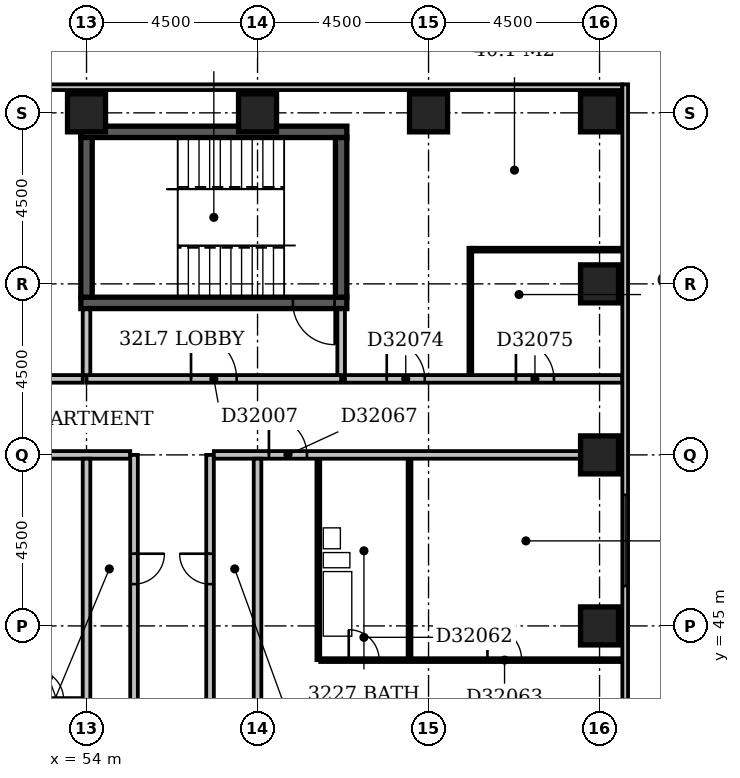
"""IFC4 building model, lengths in metres.
Left out: names, types, materials, properties, quantities, classifications, styles, units other than length and angle.
Written with IfcOpenShell. Run it as: python <this file> out.ifc"""

import sys

from ifc_helpers import new_model, si_unit, direction, frame, frame_2d, origin, origin_2d, place, context, subcontext, project, spatial, rectangle, extrude, element, fill, save


model = new_model("IFC4")
c1 = context("Model", 3, precision=1e-05, world=origin(), true_north=direction((0.0, 1.0)))
c2 = subcontext(c1, "Body", "Model", "MODEL_VIEW")
j1 = project(units=[si_unit("LENGTHUNIT", "METRE"), si_unit("PLANEANGLEUNIT", "RADIAN")], contexts=[c1])
p1 = place(None, origin())
s1 = spatial("IfcSite", under=j1, at=p1, CompositionType="ELEMENT")
p2 = place(p1, origin())
s2 = spatial("IfcBuilding", under=s1, at=p2, CompositionType="ELEMENT")
p3 = place(p2, frame((0.0, 0.0, 130.4)))
s3 = spatial("IfcBuildingStorey", under=s2, at=p3, CompositionType="ELEMENT", Elevation=130.4)
p4 = place(p3, frame((53.85, 53.5, -0.3), z_axis=(0.0, 0.0, 1.0), x_axis=(1.0, 0.0, 0.0)))
e1 = element("IfcWall", 1, at=p4, inside=s3, PredefinedType="SHEAR", context=c2, shape_type="SweptSolid", body=[
    extrude(rectangle(XDim=7.0, YDim=0.3, at=frame_2d((3.5, 0.0))), origin(), (0.0, 0.0, 1.0), 3.6),
])
p5 = place(p4, frame((5.58, 0.0, 0.3)))
e2 = element("IfcOpeningElement", 2, at=p5, cuts=e1, PredefinedType="OPENING", context=c2, shape_type="SweptSolid", body=[
    extrude(rectangle(XDim=1.1, YDim=2.1, at=frame_2d((0.55, 1.05))), frame((0.0, 0.162, 0.0), z_axis=(0.0, -1.0, 0.0), x_axis=(1.0, 0.0, 0.0)), (0.0, 0.0, 1.0), 0.324),
])
p6 = place(p3, frame((53.85, 58.0, -0.3), z_axis=(0.0, 0.0, 1.0), x_axis=(1.0, 0.0, 0.0)))
e3 = element("IfcWall", 3, at=p6, inside=s3, PredefinedType="SHEAR", context=c2, shape_type="SweptSolid", body=[
    extrude(rectangle(XDim=7.0, YDim=0.3, at=frame_2d((3.5, 0.0))), origin(), (0.0, 0.0, 1.0), 3.6),
])
for number, where, z_axis, x_axis in (
    (4, (54.0, 53.65, -0.3), (0.0, 0.0, 1.0), (0.0, 1.0, 0.0)),
    (5, (60.7, 53.65, -0.3), (0.0, 0.0, 1.0), (0.0, 1.0, 0.0)),
):
    element("IfcWall", number, at=place(p3, frame(where, z_axis=z_axis, x_axis=x_axis)), inside=s3, PredefinedType="SHEAR", context=c2, shape_type="SweptSolid", body=[
        extrude(rectangle(XDim=4.2, YDim=0.3, at=frame_2d((2.1, 0.0))), origin(), (0.0, 0.0, 1.0), 3.6),
    ])
for number, where, z_axis, x_axis in (
    (6, (67.5, 45.0, -0.3), (0.0, 0.0, 1.0), (1.0, 0.0, 0.0)),
    (7, (67.5, 49.5, -0.3), (0.0, 0.0, 1.0), (1.0, 0.0, 0.0)),
    (8, (67.5, 54.0, -0.3), (0.0, 0.0, 1.0), (1.0, 0.0, 0.0)),
    (9, (54.0, 58.5, -0.3), (0.0, 0.0, 1.0), (1.0, 0.0, 0.0)),
    (10, (58.5, 58.5, -0.3), (0.0, 0.0, 1.0), (1.0, 0.0, 0.0)),
    (11, (63.0, 58.5, -0.3), (0.0, 0.0, 1.0), (1.0, 0.0, 0.0)),
    (12, (67.5, 58.5, -0.3), (0.0, 0.0, 1.0), (1.0, 0.0, 0.0)),
):
    element("IfcColumn", number, at=place(p3, frame(where, z_axis=z_axis, x_axis=x_axis)), inside=s3, PredefinedType="COLUMN", context=c2, shape_type="SweptSolid", body=[
        extrude(rectangle(XDim=1.0, YDim=1.0, at=origin_2d()), origin(), (0.0, 0.0, 1.0), 3.6),
    ])
p7 = place(p3, frame((68.175, 35.4, 0.0), z_axis=(0.0, 0.0, 1.0), x_axis=(0.0, 1.0, 0.0)))
e13 = element("IfcWall", 13, at=p7, inside=s3, PredefinedType="STANDARD", context=c2, shape_type="SweptSolid", body=[
    extrude(rectangle(XDim=23.85, YDim=0.15, at=frame_2d((11.925, 0.0))), origin(), (0.0, 0.0, 1.0), 2.7),
])
p8 = place(p7, frame((1.65, 0.0, 0.6)))
e14 = element("IfcOpeningElement", 14, at=p8, cuts=e13, PredefinedType="OPENING", context=c2, shape_type="SweptSolid", body=[
    extrude(rectangle(XDim=2.4, YDim=1.8, at=frame_2d((1.2, 0.9))), frame((0.0, 0.087, 0.0), z_axis=(0.0, -1.0, 0.0), x_axis=(1.0, 0.0, 0.0)), (0.0, 0.0, 1.0), 0.174),
])
p9 = place(p7, frame((10.65, 0.0, 0.6)))
e15 = element("IfcOpeningElement", 15, at=p9, cuts=e13, PredefinedType="OPENING", context=c2, shape_type="SweptSolid", body=[
    extrude(rectangle(XDim=2.4, YDim=1.8, at=frame_2d((1.2, 0.9))), frame((0.0, 0.087, 0.0), z_axis=(0.0, -1.0, 0.0), x_axis=(1.0, 0.0, 0.0)), (0.0, 0.0, 1.0), 0.174),
])
p10 = place(p3, frame((68.1, 59.175, 0.0), z_axis=(0.0, 0.0, 1.0), x_axis=(-1.0, 0.0, 0.0)))
e16 = element("IfcWall", 16, at=p10, inside=s3, PredefinedType="STANDARD", context=c2, shape_type="SweptSolid", body=[
    extrude(rectangle(XDim=68.85, YDim=0.15, at=frame_2d((34.425, 0.0))), origin(), (0.0, 0.0, 1.0), 2.7),
])
p11 = place(p3, frame((54.0, 51.5, 0.0), z_axis=(0.0, 0.0, 1.0), x_axis=(1.0, 0.0, 0.0)))
e17 = element("IfcWall", 17, at=p11, inside=s3, PredefinedType="PARTITIONING", context=c2, shape_type="SweptSolid", body=[
    extrude(rectangle(XDim=6.7, YDim=0.2, at=frame_2d((3.35, 0.0))), origin(), (0.0, 0.0, 1.0), 3.3),
])
p12 = place(p11, frame((2.75, 0.0, 0.0)))
e18 = element("IfcOpeningElement", 18, at=p12, cuts=e17, PredefinedType="OPENING", context=c2, shape_type="SweptSolid", body=[
    extrude(rectangle(XDim=1.2, YDim=2.1, at=frame_2d((0.6, 1.05))), frame((0.0, 0.112, 0.0), z_axis=(0.0, -1.0, 0.0), x_axis=(1.0, 0.0, 0.0)), (0.0, 0.0, 1.0), 0.224),
])
p13 = place(p3, frame((60.7, 51.6, 0.0), z_axis=(0.0, 0.0, 1.0), x_axis=(0.0, 1.0, 0.0)))
e19 = element("IfcWall", 19, at=p13, inside=s3, PredefinedType="PARTITIONING", context=c2, shape_type="SweptSolid", body=[
    extrude(rectangle(XDim=1.73, YDim=0.2, at=frame_2d((0.865, 0.0))), origin(), (0.0, 0.0, 1.0), 3.3),
])
p14 = place(p3, frame((54.0, 51.6, 0.0), z_axis=(0.0, 0.0, 1.0), x_axis=(0.0, 1.0, 0.0)))
e20 = element("IfcWall", 20, at=p14, inside=s3, PredefinedType="PARTITIONING", context=c2, shape_type="SweptSolid", body=[
    extrude(rectangle(XDim=1.73, YDim=0.2, at=frame_2d((0.865, 0.0))), origin(), (0.0, 0.0, 1.0), 2.6),
])
p15 = place(p3, frame((54.0, 36.5, 0.0), z_axis=(0.0, 0.0, 1.0), x_axis=(0.0, 1.0, 0.0)))
e21 = element("IfcWall", 21, at=p15, inside=s3, PredefinedType="PARTITIONING", context=c2, shape_type="SweptSolid", body=[
    extrude(rectangle(XDim=12.9, YDim=0.2, at=frame_2d((6.45, 0.0))), origin(), (0.0, 0.0, 1.0), 2.6),
])
p16 = place(p3, frame((58.5, 36.5, 0.0), z_axis=(0.0, 0.0, 1.0), x_axis=(0.0, 1.0, 0.0)))
e22 = element("IfcWall", 22, at=p16, inside=s3, PredefinedType="PARTITIONING", context=c2, shape_type="SweptSolid", body=[
    extrude(rectangle(XDim=12.9, YDim=0.2, at=frame_2d((6.45, 0.0))), origin(), (0.0, 0.0, 1.0), 3.3),
])
p17 = place(p3, frame((55.25, 40.55, 0.0), z_axis=(0.0, 0.0, 1.0), x_axis=(0.0, 1.0, 0.0)))
e23 = element("IfcWall", 23, at=p17, inside=s3, PredefinedType="PARTITIONING", context=c2, shape_type="SweptSolid", body=[
    extrude(rectangle(XDim=8.95, YDim=0.2, at=frame_2d((4.475, 0.0))), origin(), (0.0, 0.0, 1.0), 3.3),
])
p18 = place(p17, frame((5.55, 0.0, 0.0)))
e24 = element("IfcOpeningElement", 24, at=p18, cuts=e23, PredefinedType="OPENING", context=c2, shape_type="SweptSolid", body=[
    extrude(rectangle(XDim=0.8, YDim=2.1, at=frame_2d((0.4, 1.05))), frame((0.0, 0.112, 0.0), z_axis=(0.0, -1.0, 0.0), x_axis=(1.0, 0.0, 0.0)), (0.0, 0.0, 1.0), 0.224),
])
p19 = place(p3, frame((57.25, 40.55, 0.0), z_axis=(0.0, 0.0, 1.0), x_axis=(0.0, 1.0, 0.0)))
e25 = element("IfcWall", 25, at=p19, inside=s3, PredefinedType="PARTITIONING", context=c2, shape_type="SweptSolid", body=[
    extrude(rectangle(XDim=8.95, YDim=0.2, at=frame_2d((4.475, 0.0))), origin(), (0.0, 0.0, 1.0), 3.3),
])
p20 = place(p19, frame((5.55, 0.0, 0.0)))
e26 = element("IfcOpeningElement", 26, at=p20, cuts=e25, PredefinedType="OPENING", context=c2, shape_type="SweptSolid", body=[
    extrude(rectangle(XDim=0.8, YDim=2.1, at=frame_2d((0.4, 1.05))), frame((0.0, 0.112, 0.0), z_axis=(0.0, -1.0, 0.0), x_axis=(1.0, 0.0, 0.0)), (0.0, 0.0, 1.0), 0.224),
])
p21 = place(p3, frame((60.1, 44.1, 0.0), z_axis=(0.0, 0.0, 1.0), x_axis=(0.0, 1.0, 0.0)))
e27 = element("IfcWall", 27, at=p21, inside=s3, PredefinedType="PLUMBINGWALL", context=c2, shape_type="SweptSolid", body=[
    extrude(rectangle(XDim=5.3, YDim=0.1, at=frame_2d((2.65, 0.0))), origin(), (0.0, 0.0, 1.0), 3.3),
])
p22 = place(p3, frame((60.15, 44.1, 0.0), z_axis=(0.0, 0.0, 1.0), x_axis=(1.0, 0.0, 0.0)))
e28 = element("IfcWall", 28, at=p22, inside=s3, PredefinedType="PARTITIONING", context=c2, shape_type="SweptSolid", body=[
    extrude(rectangle(XDim=7.95, YDim=0.1, at=frame_2d((3.975, 0.0))), origin(), (0.0, 0.0, 1.0), 3.3),
])
p23 = place(p22, frame((0.75, 0.0, 0.0)))
e29 = element("IfcOpeningElement", 29, at=p23, cuts=e28, PredefinedType="OPENING", context=c2, shape_type="SweptSolid", body=[
    extrude(rectangle(XDim=0.8, YDim=2.1, at=frame_2d((0.4, 1.05))), frame((0.0, 0.062, 0.0), z_axis=(0.0, -1.0, 0.0), x_axis=(1.0, 0.0, 0.0)), (0.0, 0.0, 1.0), 0.124),
])
p24 = place(p22, frame((4.4, 0.0, 0.0)))
e30 = element("IfcOpeningElement", 30, at=p24, cuts=e28, PredefinedType="OPENING", context=c2, shape_type="SweptSolid", body=[
    extrude(rectangle(XDim=0.9, YDim=2.1, at=frame_2d((0.45, 1.05))), frame((0.0, 0.062, 0.0), z_axis=(0.0, -1.0, 0.0), x_axis=(1.0, 0.0, 0.0)), (0.0, 0.0, 1.0), 0.124),
])
p25 = place(p3, frame((62.5, 44.15, 0.0), z_axis=(0.0, 0.0, 1.0), x_axis=(0.0, 1.0, 0.0)))
e31 = element("IfcWall", 31, at=p25, inside=s3, PredefinedType="PLUMBINGWALL", context=c2, shape_type="SweptSolid", body=[
    extrude(rectangle(XDim=5.25, YDim=0.1, at=frame_2d((2.625, 0.0))), origin(), (0.0, 0.0, 1.0), 2.4),
])
p26 = place(p3, frame((39.35, 49.5, 0.0), z_axis=(0.0, 0.0, 1.0), x_axis=(1.0, 0.0, 0.0)))
e32 = element("IfcWall", 32, at=p26, inside=s3, PredefinedType="PARTITIONING", context=c2, shape_type="SweptSolid", body=[
    extrude(rectangle(XDim=15.8, YDim=0.2, at=frame_2d((7.9, 0.0))), origin(), (0.0, 0.0, 1.0), 3.3),
])
p27 = place(p26, frame((1.45, 0.0, 0.0)))
e33 = element("IfcOpeningElement", 33, at=p27, cuts=e32, PredefinedType="OPENING", context=c2, shape_type="SweptSolid", body=[
    extrude(rectangle(XDim=1.0, YDim=2.1, at=frame_2d((0.5, 1.05))), frame((0.0, 0.112, 0.0), z_axis=(0.0, -1.0, 0.0), x_axis=(1.0, 0.0, 0.0)), (0.0, 0.0, 1.0), 0.224),
])
p28 = place(p3, frame((57.35, 49.5, 0.0), z_axis=(0.0, 0.0, 1.0), x_axis=(1.0, 0.0, 0.0)))
e34 = element("IfcWall", 34, at=p28, inside=s3, PredefinedType="PARTITIONING", context=c2, shape_type="SweptSolid", body=[
    extrude(rectangle(XDim=9.65, YDim=0.2, at=frame_2d((4.825, 0.0))), origin(), (0.0, 0.0, 1.0), 3.3),
])
p29 = place(p28, frame((1.45, 0.0, 0.0)))
e35 = element("IfcOpeningElement", 35, at=p29, cuts=e34, PredefinedType="OPENING", context=c2, shape_type="SweptSolid", body=[
    extrude(rectangle(XDim=1.0, YDim=2.1, at=frame_2d((0.5, 1.05))), frame((0.0, 0.112, 0.0), z_axis=(0.0, -1.0, 0.0), x_axis=(1.0, 0.0, 0.0)), (0.0, 0.0, 1.0), 0.224),
])
p30 = place(p3, frame((44.1, 51.5, 0.0), z_axis=(0.0, 0.0, 1.0), x_axis=(1.0, 0.0, 0.0)))
e36 = element("IfcWall", 36, at=p30, inside=s3, PredefinedType="PARTITIONING", context=c2, shape_type="SweptSolid", body=[
    extrude(rectangle(XDim=9.8, YDim=0.2, at=frame_2d((4.9, 0.0))), origin(), (0.0, 0.0, 1.0), 3.3),
])
p31 = place(p30, frame((1.9, 0.0, 0.0)))
e37 = element("IfcOpeningElement", 37, at=p31, cuts=e36, PredefinedType="OPENING", context=c2, shape_type="SweptSolid", body=[
    extrude(rectangle(XDim=1.0, YDim=2.1, at=frame_2d((0.5, 1.05))), frame((0.0, 0.112, 0.0), z_axis=(0.0, -1.0, 0.0), x_axis=(1.0, 0.0, 0.0)), (0.0, 0.0, 1.0), 0.224),
])
p32 = place(p30, frame((6.9, 0.0, 0.0)))
e38 = element("IfcOpeningElement", 38, at=p32, cuts=e36, PredefinedType="OPENING", context=c2, shape_type="SweptSolid", body=[
    extrude(rectangle(XDim=1.0, YDim=2.1, at=frame_2d((0.5, 1.05))), frame((0.0, 0.112, 0.0), z_axis=(0.0, -1.0, 0.0), x_axis=(1.0, 0.0, 0.0)), (0.0, 0.0, 1.0), 0.224),
])
p33 = place(p3, frame((60.8, 51.5, 0.0), z_axis=(0.0, 0.0, 1.0), x_axis=(1.0, 0.0, 0.0)))
e39 = element("IfcWall", 39, at=p33, inside=s3, PredefinedType="PARTITIONING", context=c2, shape_type="SweptSolid", body=[
    extrude(rectangle(XDim=7.3, YDim=0.2, at=frame_2d((3.65, 0.0))), origin(), (0.0, 0.0, 1.0), 3.3),
])
p34 = place(p33, frame((1.1, 0.0, 0.0)))
e40 = element("IfcOpeningElement", 40, at=p34, cuts=e39, PredefinedType="OPENING", context=c2, shape_type="SweptSolid", body=[
    extrude(rectangle(XDim=1.0, YDim=2.1, at=frame_2d((0.5, 1.05))), frame((0.0, 0.112, 0.0), z_axis=(0.0, -1.0, 0.0), x_axis=(1.0, 0.0, 0.0)), (0.0, 0.0, 1.0), 0.224),
])
p35 = place(p33, frame((4.5, 0.0, 0.0)))
e41 = element("IfcOpeningElement", 41, at=p35, cuts=e39, PredefinedType="OPENING", context=c2, shape_type="SweptSolid", body=[
    extrude(rectangle(XDim=1.0, YDim=2.1, at=frame_2d((0.5, 1.05))), frame((0.0, 0.112, 0.0), z_axis=(0.0, -1.0, 0.0), x_axis=(1.0, 0.0, 0.0)), (0.0, 0.0, 1.0), 0.224),
])
p36 = place(p3, frame((64.1, 51.6, 0.0), z_axis=(0.0, 0.0, 1.0), x_axis=(0.0, 1.0, 0.0)))
e42 = element("IfcWall", 42, at=p36, inside=s3, PredefinedType="PARTITIONING", context=c2, shape_type="SweptSolid", body=[
    extrude(rectangle(XDim=3.35, YDim=0.1, at=frame_2d((1.675, 0.0))), origin(), (0.0, 0.0, 1.0), 3.3),
])
p37 = place(p3, frame((64.15, 54.9, 0.0), z_axis=(0.0, 0.0, 1.0), x_axis=(1.0, 0.0, 0.0)))
e43 = element("IfcWall", 43, at=p37, inside=s3, PredefinedType="PARTITIONING", context=c2, shape_type="SweptSolid", body=[
    extrude(rectangle(XDim=3.95, YDim=0.1, at=frame_2d((1.975, 0.0))), origin(), (0.0, 0.0, 1.0), 3.3),
])
p38 = place(p9, origin())
e44 = element("IfcWindow", 44, at=p38, inside=s3, PartitioningType="SINGLE_PANEL", PredefinedType="WINDOW", context=c2, shape_type="SweptSolid", body=[
    extrude(rectangle(XDim=2.4, YDim=1.8, at=frame_2d((1.2, 0.9))), frame((0.0, 0.03, 0.0), z_axis=(0.0, -1.0, 0.0), x_axis=(1.0, 0.0, 0.0)), (0.0, 0.0, 1.0), 0.06),
])
fill(e15, e44)
p39 = place(p12, origin())
e45 = element("IfcDoor", 45, at=p39, inside=s3, OperationType="SINGLE_SWING_LEFT", PredefinedType="DOOR", context=c2, shape_type="SweptSolid", body=[
    extrude(rectangle(XDim=1.2, YDim=2.1, at=frame_2d((0.6, 1.05))), frame((0.0, 0.025, 0.0), z_axis=(0.0, -1.0, 0.0), x_axis=(1.0, 0.0, 0.0)), (0.0, 0.0, 1.0), 0.05),
])
fill(e18, e45)
p40 = place(p5, origin())
e46 = element("IfcDoor", 46, at=p40, inside=s3, OperationType="SINGLE_SWING_RIGHT", PredefinedType="DOOR", context=c2, shape_type="SweptSolid", body=[
    extrude(rectangle(XDim=1.1, YDim=2.1, at=frame_2d((0.55, 1.05))), frame((0.0, 0.025, 0.0), z_axis=(0.0, -1.0, 0.0), x_axis=(1.0, 0.0, 0.0)), (0.0, 0.0, 1.0), 0.05),
])
fill(e2, e46)
p41 = place(p18, origin())
e47 = element("IfcDoor", 47, at=p41, inside=s3, OperationType="SINGLE_SWING_RIGHT", PredefinedType="DOOR", context=c2, shape_type="SweptSolid", body=[
    extrude(rectangle(XDim=0.8, YDim=2.1, at=frame_2d((0.4, 1.05))), frame((0.0, 0.025, 0.0), z_axis=(0.0, -1.0, 0.0), x_axis=(1.0, 0.0, 0.0)), (0.0, 0.0, 1.0), 0.05),
])
fill(e24, e47)
p42 = place(p20, frame((0.8, 0.0, 0.0), z_axis=(0.0, 0.0, 1.0), x_axis=(-1.0, 0.0, 0.0)))
e48 = element("IfcDoor", 48, at=p42, inside=s3, OperationType="SINGLE_SWING_LEFT", PredefinedType="DOOR", context=c2, shape_type="SweptSolid", body=[
    extrude(rectangle(XDim=0.8, YDim=2.1, at=frame_2d((0.4, 1.05))), frame((0.0, 0.025, 0.0), z_axis=(0.0, -1.0, 0.0), x_axis=(1.0, 0.0, 0.0)), (0.0, 0.0, 1.0), 0.05),
])
fill(e26, e48)
p43 = place(p23, origin())
e49 = element("IfcDoor", 49, at=p43, inside=s3, OperationType="SINGLE_SWING_LEFT", PredefinedType="DOOR", context=c2, shape_type="SweptSolid", body=[
    extrude(rectangle(XDim=0.8, YDim=2.1, at=frame_2d((0.4, 1.05))), frame((0.0, 0.025, 0.0), z_axis=(0.0, -1.0, 0.0), x_axis=(1.0, 0.0, 0.0)), (0.0, 0.0, 1.0), 0.05),
])
fill(e29, e49)
p44 = place(p24, origin())
e50 = element("IfcDoor", 50, at=p44, inside=s3, OperationType="SINGLE_SWING_LEFT", PredefinedType="DOOR", context=c2, shape_type="SweptSolid", body=[
    extrude(rectangle(XDim=0.9, YDim=2.1, at=frame_2d((0.45, 1.05))), frame((0.0, 0.025, 0.0), z_axis=(0.0, -1.0, 0.0), x_axis=(1.0, 0.0, 0.0)), (0.0, 0.0, 1.0), 0.05),
])
fill(e30, e50)
p45 = place(p29, origin())
e51 = element("IfcDoor", 51, at=p45, inside=s3, OperationType="SINGLE_SWING_LEFT", PredefinedType="DOOR", context=c2, shape_type="SweptSolid", body=[
    extrude(rectangle(XDim=1.0, YDim=2.1, at=frame_2d((0.5, 1.05))), frame((0.0, 0.025, 0.0), z_axis=(0.0, -1.0, 0.0), x_axis=(1.0, 0.0, 0.0)), (0.0, 0.0, 1.0), 0.05),
])
fill(e35, e51)
p46 = place(p34, origin())
e52 = element("IfcDoor", 52, at=p46, inside=s3, OperationType="SINGLE_SWING_LEFT", PredefinedType="DOOR", context=c2, shape_type="SweptSolid", body=[
    extrude(rectangle(XDim=1.0, YDim=2.1, at=frame_2d((0.5, 1.05))), frame((0.0, 0.025, 0.0), z_axis=(0.0, -1.0, 0.0), x_axis=(1.0, 0.0, 0.0)), (0.0, 0.0, 1.0), 0.05),
])
fill(e40, e52)
p47 = place(p35, origin())
e53 = element("IfcDoor", 53, at=p47, inside=s3, OperationType="SINGLE_SWING_LEFT", PredefinedType="DOOR", context=c2, shape_type="SweptSolid", body=[
    extrude(rectangle(XDim=1.0, YDim=2.1, at=frame_2d((0.5, 1.05))), frame((0.0, 0.025, 0.0), z_axis=(0.0, -1.0, 0.0), x_axis=(1.0, 0.0, 0.0)), (0.0, 0.0, 1.0), 0.05),
])
fill(e41, e53)
save(model, sys.argv[1])
